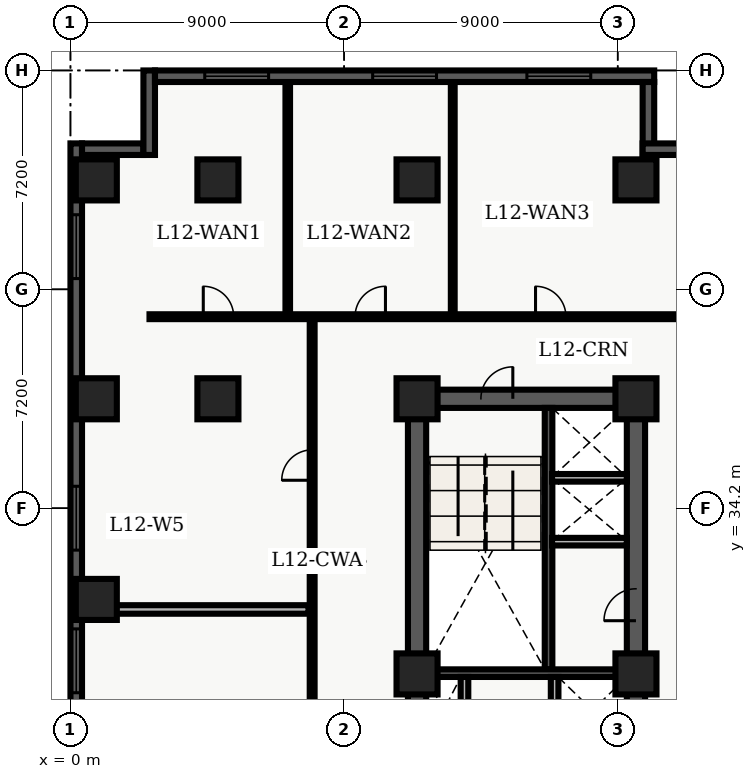
"""IFC4 building model, lengths in metres.
Left out: names, types, materials, properties, quantities, classifications, styles, units other than length and angle.
Written with IfcOpenShell. Run it as: python <this file> out.ifc"""

import sys

from ifc_helpers import new_model, entity, si_unit, converted_unit, direction, frame, origin_with_axes, origin_2d_with_axis, place, context, subcontext, project, spatial, polyline, rectangle, outline, extrude, element, fill, save


model = new_model("IFC4")
c1 = context("Model", 3, precision=1e-05, world=origin_with_axes(), true_north=direction((0.0, 1.0)))
c2 = subcontext(c1, "Body", "Model", "MODEL_VIEW")
j1 = project(units=[si_unit("LENGTHUNIT", "METRE"), converted_unit("PLANEANGLEUNIT", "DEGREE", entity("IfcPlaneAngleMeasure", 0.017), si_unit("PLANEANGLEUNIT", "RADIAN"), dimensions=[0, 0, 0, 0, 0, 0, 0])], contexts=[c1])
p1 = place(None, origin_with_axes())
s1 = spatial("IfcSite", under=j1, at=p1, CompositionType="ELEMENT")
p2 = place(p1, origin_with_axes())
s2 = spatial("IfcBuilding", under=s1, at=p2, CompositionType="ELEMENT")
p3 = place(p2, frame((0.0, 0.0, 52.2), z_axis=(0.0, 0.0, 1.0), x_axis=(1.0, 0.0, 0.0)))
s3 = spatial("IfcBuildingStorey", under=s2, at=p3, CompositionType="ELEMENT", Elevation=52.2)
p4 = place(p3, frame((11.4, 10.8, 0.0), z_axis=(0.0, 0.0, 1.0), x_axis=(0.0, 1.0, 0.0)))
e1 = element("IfcWall", 1, at=p4, inside=s3, PredefinedType="SHEAR", context=c2, shape_type="SweptSolid", body=[
    extrude(outline(polyline([(0.0, -0.3), (27.0, -0.3), (27.0, 0.3), (0.0, 0.3), (0.0, -0.3)])), origin_with_axes(), (0.0, 0.0, 1.0), 3.66),
])
p5 = place(p3, frame((11.4, 37.8, 0.0), z_axis=(0.0, 0.0, 1.0), x_axis=(1.0, 0.0, 0.0)))
e2 = element("IfcWall", 2, at=p5, inside=s3, PredefinedType="SHEAR", context=c2, shape_type="SweptSolid", body=[
    extrude(outline(polyline([(0.0, -0.3), (7.2, -0.3), (7.2, 0.3), (0.0, 0.3), (0.0, -0.3)])), origin_with_axes(), (0.0, 0.0, 1.0), 3.66),
])
p6 = place(p5, frame((2.625, 0.0, 0.0), z_axis=(0.0, 0.0, 1.0), x_axis=(1.0, 0.0, 0.0)))
e3 = element("IfcOpeningElement", 3, at=p6, cuts=e2, PredefinedType="OPENING", context=c2, shape_type="SweptSolid", body=[
    extrude(rectangle(XDim=1.05, YDim=0.62, at=origin_2d_with_axis()), origin_with_axes(), (0.0, 0.0, 1.0), 2.15),
])
p7 = place(p3, frame((18.6, 24.3, 0.0), z_axis=(0.0, 0.0, 1.0), x_axis=(0.0, 1.0, 0.0)))
e4 = element("IfcWall", 4, at=p7, inside=s3, PredefinedType="SHEAR", context=c2, shape_type="SweptSolid", body=[
    extrude(outline(polyline([(0.0, -0.3), (13.5, -0.3), (13.5, 0.3), (0.0, 0.3), (0.0, -0.3)])), origin_with_axes(), (0.0, 0.0, 1.0), 3.66),
])
p8 = place(p7, frame((6.725, 0.0, 0.0), z_axis=(0.0, 0.0, 1.0), x_axis=(1.0, 0.0, 0.0)))
e5 = element("IfcOpeningElement", 5, at=p8, cuts=e4, PredefinedType="OPENING", context=c2, shape_type="SweptSolid", body=[
    extrude(rectangle(XDim=1.05, YDim=0.62, at=origin_2d_with_axis()), origin_with_axes(), (0.0, 0.0, 1.0), 2.15),
])
p9 = place(p3, frame((15.725, 28.9, 0.0), z_axis=(0.0, 0.0, 1.0), x_axis=(0.0, 1.0, 0.0)))
e6 = element("IfcWall", 6, at=p9, inside=s3, PredefinedType="SHEAR", context=c2, shape_type="SweptSolid", body=[
    extrude(outline(polyline([(0.0, -0.125), (8.6, -0.125), (8.6, 0.125), (0.0, 0.125), (0.0, -0.125)])), origin_with_axes(), (0.0, 0.0, 1.0), 3.66),
])
p10 = place(p3, frame((11.7, 28.775, 0.0), z_axis=(0.0, 0.0, 1.0), x_axis=(1.0, 0.0, 0.0)))
e7 = element("IfcWall", 7, at=p10, inside=s3, PredefinedType="SHEAR", context=c2, shape_type="SweptSolid", body=[
    extrude(outline(polyline([(0.0, -0.125), (6.6, -0.125), (6.6, 0.125), (0.0, 0.125), (0.0, -0.125)])), origin_with_axes(), (0.0, 0.0, 1.0), 3.66),
])
for number, where, z_axis, x_axis in (
    (8, (12.96, 26.45, 0.0), (0.0, 0.0, 1.0), (0.0, 1.0, 0.0)),
    (9, (15.925, 26.45, 0.0), (0.0, 0.0, 1.0), (0.0, 1.0, 0.0)),
):
    element("IfcWall", number, at=place(p3, frame(where, z_axis=z_axis, x_axis=x_axis)), inside=s3, PredefinedType="SOLIDWALL", context=c2, shape_type="SweptSolid", body=[
        extrude(outline(polyline([(0.0, -0.125), (2.2, -0.125), (2.2, 0.125), (0.0, 0.125), (0.0, -0.125)])), origin_with_axes(), (0.0, 0.0, 1.0), 2.7),
    ])
for number, where, z_axis, x_axis in (
    (10, (11.4, 28.75, 0.0), (0.0, 0.0, 1.0), (1.0, 0.0, 0.0)),
    (11, (11.4, 37.8, 0.0), (0.0, 0.0, 1.0), (1.0, 0.0, 0.0)),
    (12, (11.4, 45.0, 0.0), (0.0, 0.0, 1.0), (1.0, 0.0, 0.0)),
    (13, (18.6, 28.75, 0.0), (0.0, 0.0, 1.0), (1.0, 0.0, 0.0)),
    (14, (18.6, 37.8, 0.0), (0.0, 0.0, 1.0), (1.0, 0.0, 0.0)),
    (15, (18.6, 45.0, 0.0), (0.0, 0.0, 1.0), (1.0, 0.0, 0.0)),
    (16, (4.85, 37.8, 0.0), (0.0, 0.0, 1.0), (1.0, 0.0, 0.0)),
    (17, (4.85, 45.0, 0.0), (0.0, 0.0, 1.0), (1.0, 0.0, 0.0)),
    (18, (0.85, 31.2, 0.0), (0.0, 0.0, 1.0), (1.0, 0.0, 0.0)),
    (19, (0.85, 37.8, 0.0), (0.0, 0.0, 1.0), (1.0, 0.0, 0.0)),
    (20, (0.85, 45.0, 0.0), (0.0, 0.0, 1.0), (1.0, 0.0, 0.0)),
):
    element("IfcColumn", number, at=place(p3, frame(where, z_axis=z_axis, x_axis=x_axis)), inside=s3, PredefinedType="COLUMN", context=c2, shape_type="SweptSolid", body=[
        extrude(rectangle(XDim=1.35, YDim=1.35, at=origin_2d_with_axis()), origin_with_axes(), (0.0, 0.0, 1.0), 3.9),
    ])
for number, where, z_axis, x_axis in (
    (21, (15.84, 33.1, 0.0), (0.0, 0.0, 1.0), (1.0, 0.0, 0.0)),
    (22, (15.84, 35.2, 0.0), (0.0, 0.0, 1.0), (1.0, 0.0, 0.0)),
):
    element("IfcWall", number, at=place(p3, frame(where, z_axis=z_axis, x_axis=x_axis)), inside=s3, PredefinedType="SOLIDWALL", context=c2, shape_type="SweptSolid", body=[
        extrude(outline(polyline([(0.0, -0.125), (2.46, -0.125), (2.46, 0.125), (0.0, 0.125), (0.0, -0.125)])), origin_with_axes(), (0.0, 0.0, 1.0), 2.7),
    ])
p11 = place(p3, frame((2.6, 40.5, 0.0), z_axis=(0.0, 0.0, 1.0), x_axis=(1.0, 0.0, 0.0)))
e23 = element("IfcWall", 23, at=p11, inside=s3, PredefinedType="PARTITIONING", context=c2, shape_type="SweptSolid", body=[
    extrude(outline(polyline([(0.0, -0.08), (18.65, -0.08), (18.65, 0.08), (0.0, 0.08), (0.0, -0.08)])), origin_with_axes(), (0.0, 0.0, 1.0), 2.7),
])
p12 = place(p11, frame((2.268, 0.0, 0.0), z_axis=(0.0, 0.0, 1.0), x_axis=(1.0, 0.0, 0.0)))
e24 = element("IfcOpeningElement", 24, at=p12, cuts=e23, PredefinedType="OPENING", context=c2, shape_type="SweptSolid", body=[
    extrude(rectangle(XDim=1.0, YDim=0.18, at=origin_2d_with_axis()), origin_with_axes(), (0.0, 0.0, 1.0), 2.15),
])
p13 = place(p11, frame((7.261, 0.0, 0.0), z_axis=(0.0, 0.0, 1.0), x_axis=(1.0, 0.0, 0.0)))
e25 = element("IfcOpeningElement", 25, at=p13, cuts=e23, PredefinedType="OPENING", context=c2, shape_type="SweptSolid", body=[
    extrude(rectangle(XDim=1.0, YDim=0.18, at=origin_2d_with_axis()), origin_with_axes(), (0.0, 0.0, 1.0), 2.15),
])
p14 = place(p11, frame((13.197, 0.0, 0.0), z_axis=(0.0, 0.0, 1.0), x_axis=(1.0, 0.0, 0.0)))
e26 = element("IfcOpeningElement", 26, at=p14, cuts=e23, PredefinedType="OPENING", context=c2, shape_type="SweptSolid", body=[
    extrude(rectangle(XDim=1.0, YDim=0.18, at=origin_2d_with_axis()), origin_with_axes(), (0.0, 0.0, 1.0), 2.15),
])
p15 = place(p3, frame((7.95, 7.8, 0.0), z_axis=(0.0, 0.0, 1.0), x_axis=(0.0, 1.0, 0.0)))
e27 = element("IfcWall", 27, at=p15, inside=s3, PredefinedType="PARTITIONING", context=c2, shape_type="SweptSolid", body=[
    extrude(outline(polyline([(0.0, -0.08), (32.7, -0.08), (32.7, 0.08), (0.0, 0.08), (0.0, -0.08)])), origin_with_axes(), (0.0, 0.0, 1.0), 2.7),
])
p16 = place(p15, frame((2.288, 0.0, 0.0), z_axis=(0.0, 0.0, 1.0), x_axis=(1.0, 0.0, 0.0)))
e28 = element("IfcOpeningElement", 28, at=p16, cuts=e27, PredefinedType="OPENING", context=c2, shape_type="SweptSolid", body=[
    extrude(rectangle(XDim=1.0, YDim=0.18, at=origin_2d_with_axis()), origin_with_axes(), (0.0, 0.0, 1.0), 2.15),
])
p17 = place(p15, frame((6.971, 0.0, 0.0), z_axis=(0.0, 0.0, 1.0), x_axis=(1.0, 0.0, 0.0)))
e29 = element("IfcOpeningElement", 29, at=p17, cuts=e27, PredefinedType="OPENING", context=c2, shape_type="SweptSolid", body=[
    extrude(rectangle(XDim=1.0, YDim=0.18, at=origin_2d_with_axis()), origin_with_axes(), (0.0, 0.0, 1.0), 2.15),
])
p18 = place(p15, frame((12.598, 0.0, 0.0), z_axis=(0.0, 0.0, 1.0), x_axis=(1.0, 0.0, 0.0)))
e30 = element("IfcOpeningElement", 30, at=p18, cuts=e27, PredefinedType="OPENING", context=c2, shape_type="SweptSolid", body=[
    extrude(rectangle(XDim=1.0, YDim=0.18, at=origin_2d_with_axis()), origin_with_axes(), (0.0, 0.0, 1.0), 2.15),
])
p19 = place(p15, frame((19.386, 0.0, 0.0), z_axis=(0.0, 0.0, 1.0), x_axis=(1.0, 0.0, 0.0)))
e31 = element("IfcOpeningElement", 31, at=p19, cuts=e27, PredefinedType="OPENING", context=c2, shape_type="SweptSolid", body=[
    extrude(rectangle(XDim=1.0, YDim=0.18, at=origin_2d_with_axis()), origin_with_axes(), (0.0, 0.0, 1.0), 2.15),
])
p20 = place(p15, frame((27.82, 0.0, 0.0), z_axis=(0.0, 0.0, 1.0), x_axis=(1.0, 0.0, 0.0)))
e32 = element("IfcOpeningElement", 32, at=p20, cuts=e27, PredefinedType="OPENING", context=c2, shape_type="SweptSolid", body=[
    extrude(rectangle(XDim=1.0, YDim=0.18, at=origin_2d_with_axis()), origin_with_axes(), (0.0, 0.0, 1.0), 2.15),
])
p21 = place(p3, frame((0.375, 30.87, 0.0), z_axis=(0.0, 0.0, 1.0), x_axis=(1.0, 0.0, 0.0)))
e33 = element("IfcWall", 33, at=p21, inside=s3, PredefinedType="PARTITIONING", context=c2, shape_type="SweptSolid", body=[
    extrude(outline(polyline([(0.0, -0.14), (7.455, -0.14), (7.455, 0.14), (0.0, 0.14), (0.0, -0.14)])), origin_with_axes(), (0.0, 0.0, 1.0), 2.7),
])
p22 = place(p3, frame((7.147, 40.6, 0.0), z_axis=(0.0, 0.0, 1.0), x_axis=(0.0, 1.0, 0.0)))
e34 = element("IfcWall", 34, at=p22, inside=s3, PredefinedType="PARTITIONING", context=c2, shape_type="SweptSolid", body=[
    extrude(outline(polyline([(0.0, -0.075), (7.64, -0.075), (7.64, 0.075), (0.0, 0.075), (0.0, -0.075)])), origin_with_axes(), (0.0, 0.0, 1.0), 2.7),
])
p23 = place(p3, frame((12.574, 40.6, 0.0), z_axis=(0.0, 0.0, 1.0), x_axis=(0.0, 1.0, 0.0)))
e35 = element("IfcWall", 35, at=p23, inside=s3, PredefinedType="PARTITIONING", context=c2, shape_type="SweptSolid", body=[
    extrude(outline(polyline([(0.0, -0.062), (7.64, -0.062), (7.64, 0.062), (0.0, 0.062), (0.0, -0.062)])), origin_with_axes(), (0.0, 0.0, 1.0), 2.7),
])
p24 = place(p3, frame((0.19, 2.78, 0.0), z_axis=(0.0, 0.0, 1.0), x_axis=(0.0, 1.0, 0.0)))
e36 = element("IfcWall", 36, at=p24, inside=s3, PredefinedType="SOLIDWALL", context=c2, shape_type="SweptSolid", body=[
    extrude(outline(polyline([(0.0, -0.19), (43.42, -0.19), (43.42, 0.19), (0.0, 0.19), (0.0, -0.19)])), origin_with_axes(), (0.0, 0.0, 1.0), 3.66),
])
p25 = place(p24, frame((2.946, 0.0, 0.45), z_axis=(0.0, 0.0, 1.0), x_axis=(1.0, 0.0, 0.0)))
e37 = element("IfcOpeningElement", 37, at=p25, cuts=e36, PredefinedType="OPENING", context=c2, shape_type="SweptSolid", body=[
    extrude(rectangle(XDim=2.1, YDim=0.4, at=origin_2d_with_axis()), origin_with_axes(), (0.0, 0.0, 1.0), 2.2),
])
p26 = place(p24, frame((12.328, 0.0, 0.45), z_axis=(0.0, 0.0, 1.0), x_axis=(1.0, 0.0, 0.0)))
e38 = element("IfcOpeningElement", 38, at=p26, cuts=e36, PredefinedType="OPENING", context=c2, shape_type="SweptSolid", body=[
    extrude(rectangle(XDim=2.1, YDim=0.4, at=origin_2d_with_axis()), origin_with_axes(), (0.0, 0.0, 1.0), 2.2),
])
p27 = place(p24, frame((17.469, 0.0, 0.45), z_axis=(0.0, 0.0, 1.0), x_axis=(1.0, 0.0, 0.0)))
e39 = element("IfcOpeningElement", 39, at=p27, cuts=e36, PredefinedType="OPENING", context=c2, shape_type="SweptSolid", body=[
    extrude(rectangle(XDim=2.1, YDim=0.4, at=origin_2d_with_axis()), origin_with_axes(), (0.0, 0.0, 1.0), 2.2),
])
p28 = place(p24, frame((22.56, 0.0, 0.45), z_axis=(0.0, 0.0, 1.0), x_axis=(1.0, 0.0, 0.0)))
e40 = element("IfcOpeningElement", 40, at=p28, cuts=e36, PredefinedType="OPENING", context=c2, shape_type="SweptSolid", body=[
    extrude(rectangle(XDim=2.1, YDim=0.4, at=origin_2d_with_axis()), origin_with_axes(), (0.0, 0.0, 1.0), 2.2),
])
p29 = place(p24, frame((26.401, 0.0, 0.45), z_axis=(0.0, 0.0, 1.0), x_axis=(1.0, 0.0, 0.0)))
e41 = element("IfcOpeningElement", 41, at=p29, cuts=e36, PredefinedType="OPENING", context=c2, shape_type="SweptSolid", body=[
    extrude(rectangle(XDim=2.1, YDim=0.4, at=origin_2d_with_axis()), origin_with_axes(), (0.0, 0.0, 1.0), 2.2),
])
p30 = place(p24, frame((31.092, 0.0, 0.45), z_axis=(0.0, 0.0, 1.0), x_axis=(1.0, 0.0, 0.0)))
e42 = element("IfcOpeningElement", 42, at=p30, cuts=e36, PredefinedType="OPENING", context=c2, shape_type="SweptSolid", body=[
    extrude(rectangle(XDim=2.1, YDim=0.4, at=origin_2d_with_axis()), origin_with_axes(), (0.0, 0.0, 1.0), 2.2),
])
p31 = place(p24, frame((40.024, 0.0, 0.45), z_axis=(0.0, 0.0, 1.0), x_axis=(1.0, 0.0, 0.0)))
e43 = element("IfcOpeningElement", 43, at=p31, cuts=e36, PredefinedType="OPENING", context=c2, shape_type="SweptSolid", body=[
    extrude(rectangle(XDim=2.1, YDim=0.4, at=origin_2d_with_axis()), origin_with_axes(), (0.0, 0.0, 1.0), 2.2),
])
p32 = place(p3, frame((0.38, 46.01, 0.0), z_axis=(0.0, 0.0, 1.0), x_axis=(1.0, 0.0, 0.0)))
e44 = element("IfcWall", 44, at=p32, inside=s3, PredefinedType="SOLIDWALL", context=c2, shape_type="SweptSolid", body=[
    extrude(outline(polyline([(0.0, -0.19), (2.02, -0.19), (2.02, 0.19), (0.0, 0.19), (0.0, -0.19)])), origin_with_axes(), (0.0, 0.0, 1.0), 3.66),
])
p33 = place(p3, frame((2.59, 45.82, 0.0), z_axis=(0.0, 0.0, 1.0), x_axis=(0.0, 1.0, 0.0)))
e45 = element("IfcWall", 45, at=p33, inside=s3, PredefinedType="SOLIDWALL", context=c2, shape_type="SweptSolid", body=[
    extrude(outline(polyline([(0.0, -0.19), (2.78, -0.19), (2.78, 0.19), (0.0, 0.19), (0.0, -0.19)])), origin_with_axes(), (0.0, 0.0, 1.0), 3.66),
])
p34 = place(p3, frame((2.78, 48.41, 0.0), z_axis=(0.0, 0.0, 1.0), x_axis=(1.0, 0.0, 0.0)))
e46 = element("IfcWall", 46, at=p34, inside=s3, PredefinedType="SOLIDWALL", context=c2, shape_type="SweptSolid", body=[
    extrude(outline(polyline([(0.0, -0.19), (16.42, -0.19), (16.42, 0.19), (0.0, 0.19), (0.0, -0.19)])), origin_with_axes(), (0.0, 0.0, 1.0), 3.66),
])
p35 = place(p34, frame((2.687, 0.0, 0.45), z_axis=(0.0, 0.0, 1.0), x_axis=(1.0, 0.0, 0.0)))
e47 = element("IfcOpeningElement", 47, at=p35, cuts=e46, PredefinedType="OPENING", context=c2, shape_type="SweptSolid", body=[
    extrude(rectangle(XDim=2.1, YDim=0.4, at=origin_2d_with_axis()), origin_with_axes(), (0.0, 0.0, 1.0), 2.2),
])
p36 = place(p34, frame((8.21, 0.0, 0.45), z_axis=(0.0, 0.0, 1.0), x_axis=(1.0, 0.0, 0.0)))
e48 = element("IfcOpeningElement", 48, at=p36, cuts=e46, PredefinedType="OPENING", context=c2, shape_type="SweptSolid", body=[
    extrude(rectangle(XDim=2.1, YDim=0.4, at=origin_2d_with_axis()), origin_with_axes(), (0.0, 0.0, 1.0), 2.2),
])
p37 = place(p34, frame((13.283, 0.0, 0.45), z_axis=(0.0, 0.0, 1.0), x_axis=(1.0, 0.0, 0.0)))
e49 = element("IfcOpeningElement", 49, at=p37, cuts=e46, PredefinedType="OPENING", context=c2, shape_type="SweptSolid", body=[
    extrude(rectangle(XDim=2.1, YDim=0.4, at=origin_2d_with_axis()), origin_with_axes(), (0.0, 0.0, 1.0), 2.2),
])
p38 = place(p3, frame((19.01, 48.22, 0.0), z_axis=(0.0, 0.0, 1.0), x_axis=(0.0, -1.0, 0.0)))
e50 = element("IfcWall", 50, at=p38, inside=s3, PredefinedType="SOLIDWALL", context=c2, shape_type="SweptSolid", body=[
    extrude(outline(polyline([(0.0, -0.19), (2.56, -0.19), (2.56, 0.19), (0.0, 0.19), (0.0, -0.19)])), origin_with_axes(), (0.0, 0.0, 1.0), 3.66),
])
p39 = place(p3, frame((18.82, 46.01, 0.0), z_axis=(0.0, 0.0, 1.0), x_axis=(1.0, 0.0, 0.0)))
e51 = element("IfcWall", 51, at=p39, inside=s3, PredefinedType="SOLIDWALL", context=c2, shape_type="SweptSolid", body=[
    extrude(outline(polyline([(0.0, -0.19), (2.78, -0.19), (2.78, 0.19), (0.0, 0.19), (0.0, -0.19)])), origin_with_axes(), (0.0, 0.0, 1.0), 3.66),
])
p40 = place(p5, frame((2.625, 0.0, 0.0), z_axis=(0.0, 0.0, 1.0), x_axis=(1.0, 0.0, 0.0)))
e52 = element("IfcDoor", 52, at=p40, inside=s3, OperationType="SINGLE_SWING_RIGHT", PredefinedType="DOOR", context=c2, shape_type="SweptSolid", body=[
    extrude(rectangle(XDim=1.05, YDim=0.09, at=origin_2d_with_axis()), origin_with_axes(), (0.0, 0.0, 1.0), 2.15),
])
fill(e3, e52)
p41 = place(p7, frame((6.725, 0.0, 0.0), z_axis=(0.0, 0.0, 1.0), x_axis=(1.0, 0.0, 0.0)))
e53 = element("IfcDoor", 53, at=p41, inside=s3, OperationType="SINGLE_SWING_LEFT", PredefinedType="DOOR", context=c2, shape_type="SweptSolid", body=[
    extrude(rectangle(XDim=1.05, YDim=0.09, at=origin_2d_with_axis()), origin_with_axes(), (0.0, 0.0, 1.0), 2.15),
])
fill(e5, e53)
p42 = place(p15, frame((27.82, 0.0, 0.0), z_axis=(0.0, 0.0, 1.0), x_axis=(1.0, 0.0, 0.0)))
e54 = element("IfcDoor", 54, at=p42, inside=s3, OperationType="SINGLE_SWING_LEFT", PredefinedType="DOOR", context=c2, shape_type="SweptSolid", body=[
    extrude(rectangle(XDim=1.0, YDim=0.09, at=origin_2d_with_axis()), origin_with_axes(), (0.0, 0.0, 1.0), 2.15),
])
fill(e32, e54)
p43 = place(p11, frame((2.268, 0.0, 0.0), z_axis=(0.0, 0.0, 1.0), x_axis=(1.0, 0.0, 0.0)))
e55 = element("IfcDoor", 55, at=p43, inside=s3, OperationType="SINGLE_SWING_LEFT", PredefinedType="DOOR", context=c2, shape_type="SweptSolid", body=[
    extrude(rectangle(XDim=1.0, YDim=0.09, at=origin_2d_with_axis()), origin_with_axes(), (0.0, 0.0, 1.0), 2.15),
])
fill(e24, e55)
p44 = place(p11, frame((7.261, 0.0, 0.0), z_axis=(0.0, 0.0, 1.0), x_axis=(1.0, 0.0, 0.0)))
e56 = element("IfcDoor", 56, at=p44, inside=s3, OperationType="SINGLE_SWING_RIGHT", PredefinedType="DOOR", context=c2, shape_type="SweptSolid", body=[
    extrude(rectangle(XDim=1.0, YDim=0.09, at=origin_2d_with_axis()), origin_with_axes(), (0.0, 0.0, 1.0), 2.15),
])
fill(e25, e56)
p45 = place(p11, frame((13.197, 0.0, 0.0), z_axis=(0.0, 0.0, 1.0), x_axis=(1.0, 0.0, 0.0)))
e57 = element("IfcDoor", 57, at=p45, inside=s3, OperationType="SINGLE_SWING_LEFT", PredefinedType="DOOR", context=c2, shape_type="SweptSolid", body=[
    extrude(rectangle(XDim=1.0, YDim=0.09, at=origin_2d_with_axis()), origin_with_axes(), (0.0, 0.0, 1.0), 2.15),
])
fill(e26, e57)
p46 = place(p24, frame((26.401, 0.0, 0.45), z_axis=(0.0, 0.0, 1.0), x_axis=(1.0, 0.0, 0.0)))
e58 = element("IfcWindow", 58, at=p46, inside=s3, PredefinedType="WINDOW", context=c2, shape_type="SweptSolid", body=[
    extrude(rectangle(XDim=2.1, YDim=0.09, at=origin_2d_with_axis()), origin_with_axes(), (0.0, 0.0, 1.0), 2.2),
])
fill(e41, e58)
p47 = place(p24, frame((31.092, 0.0, 0.45), z_axis=(0.0, 0.0, 1.0), x_axis=(1.0, 0.0, 0.0)))
e59 = element("IfcWindow", 59, at=p47, inside=s3, PredefinedType="WINDOW", context=c2, shape_type="SweptSolid", body=[
    extrude(rectangle(XDim=2.1, YDim=0.09, at=origin_2d_with_axis()), origin_with_axes(), (0.0, 0.0, 1.0), 2.2),
])
fill(e42, e59)
p48 = place(p24, frame((40.024, 0.0, 0.45), z_axis=(0.0, 0.0, 1.0), x_axis=(1.0, 0.0, 0.0)))
e60 = element("IfcWindow", 60, at=p48, inside=s3, PredefinedType="WINDOW", context=c2, shape_type="SweptSolid", body=[
    extrude(rectangle(XDim=2.1, YDim=0.09, at=origin_2d_with_axis()), origin_with_axes(), (0.0, 0.0, 1.0), 2.2),
])
fill(e43, e60)
p49 = place(p34, frame((2.687, 0.0, 0.45), z_axis=(0.0, 0.0, 1.0), x_axis=(1.0, 0.0, 0.0)))
e61 = element("IfcWindow", 61, at=p49, inside=s3, PredefinedType="WINDOW", context=c2, shape_type="SweptSolid", body=[
    extrude(rectangle(XDim=2.1, YDim=0.09, at=origin_2d_with_axis()), origin_with_axes(), (0.0, 0.0, 1.0), 2.2),
])
fill(e47, e61)
p50 = place(p34, frame((8.21, 0.0, 0.45), z_axis=(0.0, 0.0, 1.0), x_axis=(1.0, 0.0, 0.0)))
e62 = element("IfcWindow", 62, at=p50, inside=s3, PredefinedType="WINDOW", context=c2, shape_type="SweptSolid", body=[
    extrude(rectangle(XDim=2.1, YDim=0.09, at=origin_2d_with_axis()), origin_with_axes(), (0.0, 0.0, 1.0), 2.2),
])
fill(e48, e62)
p51 = place(p34, frame((13.283, 0.0, 0.45), z_axis=(0.0, 0.0, 1.0), x_axis=(1.0, 0.0, 0.0)))
e63 = element("IfcWindow", 63, at=p51, inside=s3, PredefinedType="WINDOW", context=c2, shape_type="SweptSolid", body=[
    extrude(rectangle(XDim=2.1, YDim=0.09, at=origin_2d_with_axis()), origin_with_axes(), (0.0, 0.0, 1.0), 2.2),
])
fill(e49, e63)
save(model, sys.argv[1])
